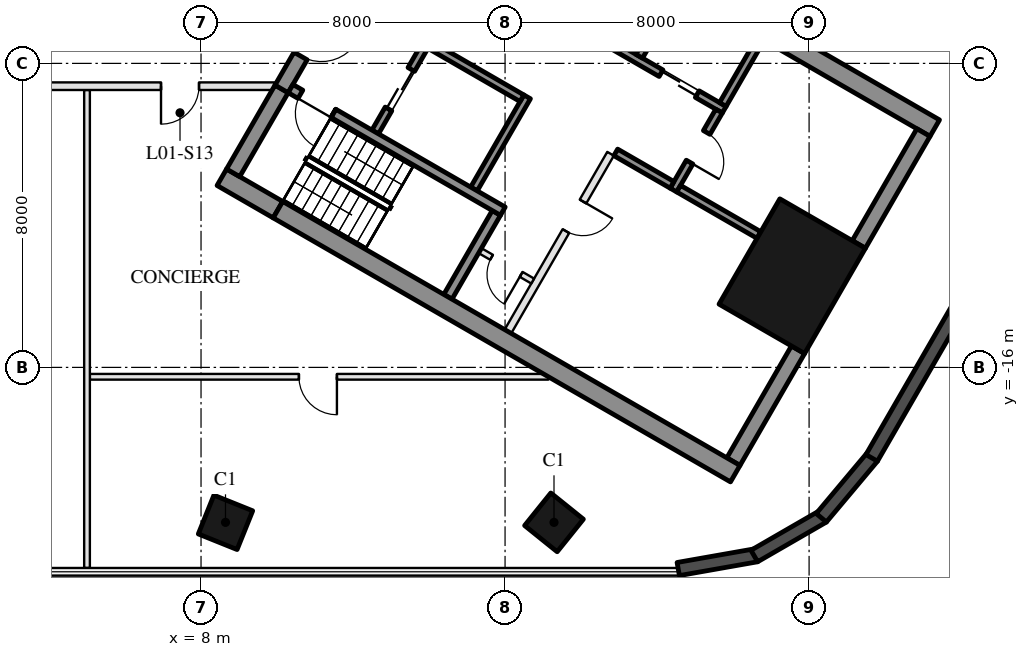
"""IFC4 building model, lengths in metres.
Left out: names, types, materials, properties, quantities, classifications, styles, units other than length and angle.
Written with IfcOpenShell. Run it as: python <this file> out.ifc"""

import sys

from ifc_helpers import new_model, si_unit, direction, frame, frame_2d, origin, origin_2d, place, context, subcontext, project, spatial, rectangle, hollow_rectangle, extrude, boolean, halfspace, element, fill, save


model = new_model("IFC4")
c1 = context("Model", 3, precision=1e-05, world=origin(), true_north=direction((0.0, 1.0)))
c2 = subcontext(c1, "Body", "Model", "MODEL_VIEW")
j1 = project(units=[si_unit("LENGTHUNIT", "METRE"), si_unit("PLANEANGLEUNIT", "RADIAN")], contexts=[c1])
p1 = place(None, origin())
s1 = spatial("IfcSite", under=j1, at=p1, CompositionType="ELEMENT")
p2 = place(p1, origin())
s2 = spatial("IfcBuilding", under=s1, at=p2, CompositionType="ELEMENT")
p3 = place(p2, frame((0.0, 0.0, 9.0)))
s3 = spatial("IfcBuildingStorey", under=s2, at=p3, CompositionType="ELEMENT", Elevation=9.0)
p4 = place(p3, frame((8.644, -20.078, 0.0), z_axis=(-0.04588570117, 0.114061937921, 0.9924134102), x_axis=(0.998942832746, 0.002476202234, 0.045902999109)))
e1 = element("IfcColumn", 1, at=p4, inside=s3, PredefinedType="COLUMN", context=c2, shape_type="SweptSolid", body=[
    boolean("DIFFERENCE", boolean("DIFFERENCE", extrude(hollow_rectangle(XDim=1.1, YDim=1.1, WallThickness=0.05, at=origin_2d()), origin(), (0.0, 0.0, 1.0), 6.55), halfspace(frame((0.0, 0.0, 0.017), z_axis=(0.0, 0.0, 1.0), x_axis=(1.0, 0.0, 0.0)), True)), halfspace(frame((0.0, 0.0, 6.534), z_axis=(0.0, 0.0, 1.0), x_axis=(1.0, 0.0, 0.0)), False)),
])
p5 = place(p3, frame((17.288, -20.078, 0.0), z_axis=(-0.091482931519, 0.113703399857, 0.989293894705), x_axis=(0.99579173161, 0.005008593821, 0.091508148518)))
e2 = element("IfcColumn", 2, at=p5, inside=s3, PredefinedType="COLUMN", context=c2, shape_type="SweptSolid", body=[
    boolean("DIFFERENCE", boolean("DIFFERENCE", extrude(hollow_rectangle(XDim=1.1, YDim=1.1, WallThickness=0.05, at=origin_2d()), origin(), (0.0, 0.0, 1.0), 6.57), halfspace(frame((0.0, 0.0, 0.019), z_axis=(0.0, 0.0, 1.0), x_axis=(1.0, 0.0, 0.0)), True)), halfspace(frame((0.0, 0.0, 6.552), z_axis=(0.0, 0.0, 1.0), x_axis=(1.0, 0.0, 0.0)), False)),
])
p6 = place(p3, frame((23.556, -13.6, 0.0), z_axis=(0.0, 0.0, 1.0), x_axis=(0.5, 0.866025403784, 0.0)))
e3 = element("IfcColumn", 3, at=p6, inside=s3, PredefinedType="COLUMN", context=c2, shape_type="SweptSolid", body=[
    extrude(hollow_rectangle(XDim=3.2, YDim=2.6, WallThickness=0.08, at=origin_2d()), origin(), (0.0, 0.0, 1.0), 6.5),
])
p7 = place(p3, frame((20.557, -21.306, 0.0), z_axis=(0.0, 0.0, 1.0), x_axis=(0.984816471064, 0.173598727877, 0.0)))
e4 = element("IfcWall", 4, at=p7, inside=s3, PredefinedType="SOLIDWALL", context=c2, shape_type="SweptSolid", body=[
    extrude(rectangle(XDim=2.09, YDim=0.35, at=frame_2d((1.045, 0.0))), origin(), (0.0, 0.0, 1.0), 6.15),
])
p8 = place(p3, frame((22.558, -20.964, 0.0), z_axis=(0.0, 0.0, 1.0), x_axis=(0.866049423672, 0.499958394027, 0.0)))
e5 = element("IfcWall", 5, at=p8, inside=s3, PredefinedType="SOLIDWALL", context=c2, shape_type="SweptSolid", body=[
    extrude(rectangle(XDim=2.09, YDim=0.35, at=frame_2d((1.045, 0.0))), origin(), (0.0, 0.0, 1.0), 6.15),
])
p9 = place(p3, frame((24.322, -19.958, 0.0), z_axis=(0.0, 0.0, 1.0), x_axis=(0.642731712352, 0.766091343076, 0.0)))
e6 = element("IfcWall", 6, at=p9, inside=s3, PredefinedType="SOLIDWALL", context=c2, shape_type="SweptSolid", body=[
    extrude(rectangle(XDim=2.09, YDim=0.35, at=frame_2d((1.045, 0.0))), origin(), (0.0, 0.0, 1.0), 6.15),
])
p10 = place(p3, frame((25.648, -18.382, 0.0), z_axis=(0.0, 0.0, 1.0), x_axis=(0.499981900942, 0.866035853028, 0.0)))
e7 = element("IfcWall", 7, at=p10, inside=s3, PredefinedType="SOLIDWALL", context=c2, shape_type="SweptSolid", body=[
    extrude(rectangle(XDim=6.191, YDim=0.35, at=frame_2d((3.095, 0.0))), origin(), (0.0, 0.0, 1.0), 6.15),
])
p11 = place(p3, frame((13.797, -1.903, 0.0), z_axis=(0.0, 0.0, 1.0), x_axis=(0.866024264262, -0.500001973705, 0.0)))
e8 = element("IfcWall", 8, at=p11, inside=s3, PredefinedType="SHEAR", context=c2, shape_type="SweptSolid", body=[
    extrude(rectangle(XDim=15.6, YDim=0.5, at=frame_2d((7.8, 0.0))), origin(), (0.0, 0.0, 1.0), 6.15),
])
p12 = place(p3, frame((25.309, -12.764, 0.0), z_axis=(0.0, 0.0, 1.0), x_axis=(0.499977295307, 0.866038511948, 0.0)))
e9 = element("IfcWall", 9, at=p12, inside=s3, PredefinedType="SHEAR", context=c2, shape_type="SweptSolid", body=[
    extrude(rectangle(XDim=3.4, YDim=0.4, at=frame_2d((1.7, 0.0))), origin(), (0.0, 0.0, 1.0), 6.15),
])
p13 = place(p3, frame((22.009, -18.48, 0.0), z_axis=(0.0, 0.0, 1.0), x_axis=(0.500008388397, 0.866020560687, 0.0)))
e10 = element("IfcWall", 10, at=p13, inside=s3, PredefinedType="SHEAR", context=c2, shape_type="SweptSolid", body=[
    extrude(rectangle(XDim=3.4, YDim=0.4, at=frame_2d((1.7, 0.0))), origin(), (0.0, 0.0, 1.0), 6.15),
])
p14 = place(p3, frame((14.496, -14.143, 0.0), z_axis=(0.0, 0.0, 1.0), x_axis=(0.500062241894, 0.865989465428, 0.0)))
e11 = element("IfcWall", 11, at=p14, inside=s3, PredefinedType="SHEAR", context=c2, shape_type="SweptSolid", body=[
    extrude(rectangle(XDim=2.55, YDim=0.25, at=frame_2d((1.275, 0.0))), origin(), (0.0, 0.0, 1.0), 6.15),
])
p15 = place(p3, frame((15.181, -11.305, 0.0), z_axis=(0.0, 0.0, 1.0), x_axis=(0.49994636267, 0.866056369097, 0.0)))
e12 = element("IfcWall", 12, at=p15, inside=s3, PredefinedType="SHEAR", context=c2, shape_type="SweptSolid", body=[
    extrude(rectangle(XDim=2.8, YDim=0.2, at=frame_2d((1.4, 0.0))), origin(), (0.0, 0.0, 1.0), 6.15),
])
p16 = place(p3, frame((12.583, -9.805, 0.0), z_axis=(0.0, 0.0, 1.0), x_axis=(0.49994636267, 0.866056369097, 0.0)))
e13 = element("IfcWall", 13, at=p16, inside=s3, PredefinedType="SHEAR", context=c2, shape_type="SweptSolid", body=[
    extrude(rectangle(XDim=2.8, YDim=0.2, at=frame_2d((1.4, 0.0))), origin(), (0.0, 0.0, 1.0), 6.15),
])
p17 = place(p16, frame((0.7, 0.0, 0.0)))
e14 = element("IfcOpeningElement", 14, at=p17, cuts=e13, PredefinedType="OPENING", context=c2, shape_type="SweptSolid", body=[
    extrude(rectangle(XDim=1.2, YDim=2.1, at=frame_2d((0.6, 1.05))), frame((0.0, 0.11, 0.0), z_axis=(0.0, -1.0, 0.0), x_axis=(1.0, 0.0, 0.0)), (0.0, 0.0, 1.0), 0.22),
])
p18 = place(p3, frame((14.02, -7.517, 0.0), z_axis=(0.0, 0.0, 1.0), x_axis=(0.866034573852, -0.49998411664, 0.0)))
e15 = element("IfcWall", 15, at=p18, inside=s3, PredefinedType="SHEAR", context=c2, shape_type="SweptSolid", body=[
    extrude(rectangle(XDim=2.8, YDim=0.2, at=frame_2d((1.4, 0.0))), origin(), (0.0, 0.0, 1.0), 6.15),
])
p19 = place(p3, frame((12.968, -4.138, 0.0), z_axis=(0.0, 0.0, 1.0), x_axis=(0.866028328073, -0.49999493495, 0.0)))
e16 = element("IfcWall", 16, at=p19, inside=s3, PredefinedType="SHEAR", context=c2, shape_type="SweptSolid", body=[
    extrude(rectangle(XDim=10.16, YDim=0.2, at=frame_2d((5.08, 0.0))), origin(), (0.0, 0.0, 1.0), 6.15),
])
p20 = place(p19, frame((0.62, 0.0, 0.0)))
e17 = element("IfcOpeningElement", 17, at=p20, cuts=e16, PredefinedType="OPENING", context=c2, shape_type="SweptSolid", body=[
    extrude(rectangle(XDim=1.1, YDim=2.1, at=frame_2d((0.55, 1.05))), frame((0.0, 0.11, 0.0), z_axis=(0.0, -1.0, 0.0), x_axis=(1.0, 0.0, 0.0)), (0.0, 0.0, 1.0), 0.22),
])
p21 = place(p19, frame((3.16, 0.0, 0.0)))
e18 = element("IfcOpeningElement", 18, at=p21, cuts=e16, PredefinedType="OPENING", context=c2, shape_type="SweptSolid", body=[
    extrude(rectangle(XDim=1.1, YDim=2.1, at=frame_2d((0.55, 1.05))), frame((0.0, 0.11, 0.0), z_axis=(0.0, -1.0, 0.0), x_axis=(1.0, 0.0, 0.0)), (0.0, 0.0, 1.0), 0.22),
])
p22 = place(p19, frame((5.7, 0.0, 0.0)))
e19 = element("IfcOpeningElement", 19, at=p22, cuts=e16, PredefinedType="OPENING", context=c2, shape_type="SweptSolid", body=[
    extrude(rectangle(XDim=1.1, YDim=2.1, at=frame_2d((0.55, 1.05))), frame((0.0, 0.11, 0.0), z_axis=(0.0, -1.0, 0.0), x_axis=(1.0, 0.0, 0.0)), (0.0, 0.0, 1.0), 0.22),
])
p23 = place(p19, frame((8.24, 0.0, 0.0)))
e20 = element("IfcOpeningElement", 20, at=p23, cuts=e16, PredefinedType="OPENING", context=c2, shape_type="SweptSolid", body=[
    extrude(rectangle(XDim=1.1, YDim=2.1, at=frame_2d((0.55, 1.05))), frame((0.0, 0.11, 0.0), z_axis=(0.0, -1.0, 0.0), x_axis=(1.0, 0.0, 0.0)), (0.0, 0.0, 1.0), 0.22),
])
p24 = place(p3, frame((20.43, -11.333, 0.0), z_axis=(0.0, 0.0, 1.0), x_axis=(0.500001309137, 0.866024647952, 0.0)))
e21 = element("IfcWall", 21, at=p24, inside=s3, PredefinedType="SHEAR", context=c2, shape_type="SweptSolid", body=[
    extrude(rectangle(XDim=2.4, YDim=0.2, at=frame_2d((1.2, 0.0))), origin(), (0.0, 0.0, 1.0), 6.15),
])
p25 = place(p24, frame((0.85, 0.0, 0.0)))
e22 = element("IfcOpeningElement", 22, at=p25, cuts=e21, PredefinedType="OPENING", context=c2, shape_type="SweptSolid", body=[
    extrude(rectangle(XDim=0.9, YDim=2.1, at=frame_2d((0.45, 1.05))), frame((0.0, 0.11, 0.0), z_axis=(0.0, -1.0, 0.0), x_axis=(1.0, 0.0, 0.0)), (0.0, 0.0, 1.0), 0.22),
])
p26 = place(p3, frame((18.913, -10.342, 0.0), z_axis=(0.0, 0.0, 1.0), x_axis=(0.866038183914, -0.499977863513, 0.0)))
e23 = element("IfcWall", 23, at=p26, inside=s3, PredefinedType="SHEAR", context=c2, shape_type="SweptSolid", body=[
    extrude(rectangle(XDim=1.71, YDim=0.2, at=frame_2d((0.855, 0.0))), origin(), (0.0, 0.0, 1.0), 6.15),
])
for number, where, z_axis, x_axis in (
    (24, (19.531, -7.812, 0.0), (0.0, 0.0, 1.0), (0.5, 0.866, 0.0)),
    (25, (21.73, -9.082, 0.0), (0.0, 0.0, 1.0), (0.5, 0.866, 0.0)),
):
    element("IfcWall", number, at=place(p3, frame(where, z_axis=z_axis, x_axis=x_axis)), inside=s3, PredefinedType="SHEAR", context=c2, shape_type="SweptSolid", body=[
        extrude(rectangle(XDim=2.0, YDim=0.2, at=frame_2d((1.0, 0.0))), origin(), (0.0, 0.0, 1.0), 6.15),
    ])
p27 = place(p3, frame((20.567, -11.297, 0.0), z_axis=(0.0, 0.0, 1.0), x_axis=(0.866048967903, -0.499959183527, 0.0)))
e26 = element("IfcWall", 26, at=p27, inside=s3, PredefinedType="SHEAR", context=c2, shape_type="SweptSolid", body=[
    extrude(rectangle(XDim=2.44, YDim=0.2, at=frame_2d((1.22, 0.0))), origin(), (0.0, 0.0, 1.0), 6.15),
])
p28 = place(p3, frame((16.076, -15.055, 0.0), z_axis=(0.0, 0.0, 1.0), x_axis=(0.499995103361, 0.866028230842, 0.0)))
e27 = element("IfcWall", 27, at=p28, inside=s3, PredefinedType="PARTITIONING", context=c2, shape_type="SweptSolid", body=[
    extrude(rectangle(XDim=5.4, YDim=0.2, at=frame_2d((2.7, 0.0))), origin(), (0.0, 0.0, 1.0), 6.15),
])
p29 = place(p28, frame((3.05, 0.0, 0.0)))
e28 = element("IfcOpeningElement", 28, at=p29, cuts=e27, PredefinedType="OPENING", context=c2, shape_type="SweptSolid", body=[
    extrude(rectangle(XDim=0.9, YDim=2.1, at=frame_2d((0.45, 1.05))), frame((0.0, 0.11, 0.0), z_axis=(0.0, -1.0, 0.0), x_axis=(1.0, 0.0, 0.0)), (0.0, 0.0, 1.0), 0.22),
])
p30 = place(p3, frame((15.342, -12.928, 0.0), z_axis=(0.0, 0.0, 1.0), x_axis=(0.865989903783, -0.500061482766, 0.0)))
e29 = element("IfcWall", 29, at=p30, inside=s3, PredefinedType="PARTITIONING", context=c2, shape_type="SweptSolid", body=[
    extrude(rectangle(XDim=1.6, YDim=0.15, at=frame_2d((0.8, 0.0))), origin(), (0.0, 0.0, 1.0), 6.15),
])
p31 = place(p30, frame((0.35, 0.0, 0.0)))
e30 = element("IfcOpeningElement", 30, at=p31, cuts=e29, PredefinedType="OPENING", context=c2, shape_type="SweptSolid", body=[
    extrude(rectangle(XDim=0.9, YDim=2.1, at=frame_2d((0.45, 1.05))), frame((0.0, 0.085, 0.0), z_axis=(0.0, -1.0, 0.0), x_axis=(1.0, 0.0, 0.0)), (0.0, 0.0, 1.0), 0.17),
])
p32 = place(p3, frame((8.547, -10.997, 0.0), z_axis=(0.0, 0.0, 1.0), x_axis=(0.866033076574, -0.499986710104, 0.0)))
e31 = element("IfcWall", 31, at=p32, inside=s3, PredefinedType="SHEAR", context=c2, shape_type="SweptSolid", body=[
    extrude(rectangle(XDim=1.706, YDim=0.5, at=frame_2d((0.853, 0.0))), origin(), (0.0, 0.0, 1.0), 6.15),
])
p33 = place(p3, frame((10.024, -11.85, 0.0), z_axis=(0.0, 0.0, 1.0), x_axis=(0.86602318214, -0.500003847982, 0.0)))
e32 = element("IfcWall", 32, at=p33, inside=s3, PredefinedType="SHEAR", context=c2, shape_type="SweptSolid", body=[
    extrude(rectangle(XDim=13.894, YDim=0.5, at=frame_2d((6.947, 0.0))), origin(), (0.0, 0.0, 1.0), 6.15),
])
p34 = place(p3, frame((8.845, -10.88, 0.0), z_axis=(0.0, 0.0, 1.0), x_axis=(0.499990435942, 0.866030925526, 0.0)))
e33 = element("IfcWall", 33, at=p34, inside=s3, PredefinedType="SHEAR", context=c2, shape_type="SweptSolid", body=[
    extrude(rectangle(XDim=2.55, YDim=0.4, at=frame_2d((1.275, 0.0))), origin(), (0.0, 0.0, 1.0), 6.15),
])
p35 = place(p3, frame((10.12, -8.672, 0.0), z_axis=(0.0, 0.0, 1.0), x_axis=(0.500008956979, 0.866020232408, 0.0)))
e34 = element("IfcWall", 34, at=p35, inside=s3, PredefinedType="SHEAR", context=c2, shape_type="SweptSolid", body=[
    extrude(rectangle(XDim=7.45, YDim=0.4, at=frame_2d((3.725, 0.0))), origin(), (0.0, 0.0, 1.0), 6.15),
])
p36 = place(p35, frame((1.0, 0.0, 0.0)))
e35 = element("IfcOpeningElement", 35, at=p36, cuts=e34, PredefinedType="OPENING", context=c2, shape_type="SweptSolid", body=[
    extrude(rectangle(XDim=1.1, YDim=2.1, at=frame_2d((0.55, 1.05))), frame((0.0, 0.21, 0.0), z_axis=(0.0, -1.0, 0.0), x_axis=(1.0, 0.0, 0.0)), (0.0, 0.0, 1.0), 0.42),
])
p37 = place(p35, frame((3.3, 0.0, 0.0)))
e36 = element("IfcOpeningElement", 36, at=p37, cuts=e34, PredefinedType="OPENING", context=c2, shape_type="SweptSolid", body=[
    extrude(rectangle(XDim=1.4, YDim=2.1, at=frame_2d((0.7, 1.05))), frame((0.0, 0.21, 0.0), z_axis=(0.0, -1.0, 0.0), x_axis=(1.0, 0.0, 0.0)), (0.0, 0.0, 1.0), 0.42),
])
p38 = place(p3, frame((10.356, -8.664, 0.0), z_axis=(0.0, 0.0, 1.0), x_axis=(0.866095317631, -0.499878886109, 0.0)))
e37 = element("IfcWall", 37, at=p38, inside=s3, PredefinedType="SHEAR", context=c2, shape_type="SweptSolid", body=[
    extrude(rectangle(XDim=1.306, YDim=0.25, at=frame_2d((0.653, 0.0))), origin(), (0.0, 0.0, 1.0), 6.15),
])
p39 = place(p38, frame((0.3, 0.0, 0.0)))
e38 = element("IfcOpeningElement", 38, at=p39, cuts=e37, PredefinedType="OPENING", context=c2, shape_type="SweptSolid", body=[
    extrude(rectangle(XDim=1.0, YDim=2.1, at=frame_2d((0.5, 1.05))), frame((0.0, 0.135, 0.0), z_axis=(0.0, -1.0, 0.0), x_axis=(1.0, 0.0, 0.0)), (0.0, 0.0, 1.0), 0.27),
])
p40 = place(p3, frame((11.487, -9.316, 0.0), z_axis=(0.0, 0.0, 1.0), x_axis=(0.866011695431, -0.500023742813, 0.0)))
e39 = element("IfcWall", 39, at=p40, inside=s3, PredefinedType="SHEAR", context=c2, shape_type="SweptSolid", body=[
    extrude(rectangle(XDim=5.144, YDim=0.25, at=frame_2d((2.572, 0.0))), origin(), (0.0, 0.0, 1.0), 6.15),
])
p41 = place(p3, frame((5.075, -16.247, 0.0), z_axis=(0.0, 0.0, 1.0), x_axis=(1.0, 0.0, 0.0)))
e40 = element("IfcWall", 40, at=p41, inside=s3, PredefinedType="PARTITIONING", context=c2, shape_type="SweptSolid", body=[
    extrude(rectangle(XDim=12.066, YDim=0.15, at=frame_2d((6.033, 0.0))), origin(), (0.0, 0.0, 1.0), 5.36),
])
p42 = place(p41, frame((5.501, 0.0, 0.0)))
e41 = element("IfcOpeningElement", 41, at=p42, cuts=e40, PredefinedType="OPENING", context=c2, shape_type="SweptSolid", body=[
    extrude(rectangle(XDim=1.0, YDim=2.1, at=frame_2d((0.5, 1.05))), frame((0.0, 0.085, 0.0), z_axis=(0.0, -1.0, 0.0), x_axis=(1.0, 0.0, 0.0)), (0.0, 0.0, 1.0), 0.17),
])
p43 = place(p3, frame((5.0, -21.278, 0.0), z_axis=(0.0, 0.0, 1.0), x_axis=(0.0, 1.0, 0.0)))
e42 = element("IfcWall", 42, at=p43, inside=s3, PredefinedType="PARTITIONING", context=c2, shape_type="SweptSolid", body=[
    extrude(rectangle(XDim=12.578, YDim=0.15, at=frame_2d((6.289, 0.0))), origin(), (0.0, 0.0, 1.0), 5.55),
])
p44 = place(p3, frame((-9.93, -8.6, 0.0), z_axis=(0.0, 0.0, 1.0), x_axis=(1.0, 0.0, 0.0)))
e43 = element("IfcWall", 43, at=p44, inside=s3, PredefinedType="PARTITIONING", context=c2, shape_type="SweptSolid", body=[
    extrude(rectangle(XDim=19.861, YDim=0.2, at=frame_2d((9.93, 0.0))), origin(), (0.0, 0.0, 1.0), 5.36),
])
p45 = place(p44, frame((1.234, 0.0, 0.0)))
e44 = element("IfcOpeningElement", 44, at=p45, cuts=e43, PredefinedType="OPENING", context=c2, shape_type="SweptSolid", body=[
    extrude(rectangle(XDim=1.2, YDim=2.1, at=frame_2d((0.6, 1.05))), frame((0.0, 0.11, 0.0), z_axis=(0.0, -1.0, 0.0), x_axis=(1.0, 0.0, 0.0)), (0.0, 0.0, 1.0), 0.22),
])
p46 = place(p44, frame((5.537, 0.0, 0.0)))
e45 = element("IfcOpeningElement", 45, at=p46, cuts=e43, PredefinedType="OPENING", context=c2, shape_type="SweptSolid", body=[
    extrude(rectangle(XDim=1.8, YDim=2.4, at=frame_2d((0.9, 1.2))), frame((0.0, 0.11, 0.0), z_axis=(0.0, -1.0, 0.0), x_axis=(1.0, 0.0, 0.0)), (0.0, 0.0, 1.0), 0.22),
])
p47 = place(p44, frame((11.224, 0.0, 0.0)))
e46 = element("IfcOpeningElement", 46, at=p47, cuts=e43, PredefinedType="OPENING", context=c2, shape_type="SweptSolid", body=[
    extrude(rectangle(XDim=1.8, YDim=2.4, at=frame_2d((0.9, 1.2))), frame((0.0, 0.11, 0.0), z_axis=(0.0, -1.0, 0.0), x_axis=(1.0, 0.0, 0.0)), (0.0, 0.0, 1.0), 0.22),
])
p48 = place(p44, frame((16.877, 0.0, 0.0)))
e47 = element("IfcOpeningElement", 47, at=p48, cuts=e43, PredefinedType="OPENING", context=c2, shape_type="SweptSolid", body=[
    extrude(rectangle(XDim=1.0, YDim=2.1, at=frame_2d((0.5, 1.05))), frame((0.0, 0.11, 0.0), z_axis=(0.0, -1.0, 0.0), x_axis=(1.0, 0.0, 0.0)), (0.0, 0.0, 1.0), 0.22),
])
p49 = place(p17, origin())
e48 = element("IfcDoor", 48, at=p49, inside=s3, OperationType="DOUBLE_DOOR_SLIDING", PredefinedType="DOOR", context=c2, shape_type="SweptSolid", body=[
    extrude(rectangle(XDim=1.2, YDim=2.1, at=frame_2d((0.6, 1.05))), frame((0.0, 0.025, 0.0), z_axis=(0.0, -1.0, 0.0), x_axis=(1.0, 0.0, 0.0)), (0.0, 0.0, 1.0), 0.05),
])
fill(e14, e48)
p50 = place(p31, frame((0.9, 0.0, 0.0), z_axis=(0.0, 0.0, 1.0), x_axis=(-1.0, 0.0, 0.0)))
e49 = element("IfcDoor", 49, at=p50, inside=s3, OperationType="SINGLE_SWING_LEFT", PredefinedType="DOOR", context=c2, shape_type="SweptSolid", body=[
    extrude(rectangle(XDim=0.9, YDim=2.1, at=frame_2d((0.45, 1.05))), frame((0.0, 0.025, 0.0), z_axis=(0.0, -1.0, 0.0), x_axis=(1.0, 0.0, 0.0)), (0.0, 0.0, 1.0), 0.05),
])
fill(e30, e49)
p51 = place(p23, origin())
e50 = element("IfcDoor", 50, at=p51, inside=s3, OperationType="DOUBLE_DOOR_SLIDING", PredefinedType="DOOR", context=c2, shape_type="SweptSolid", body=[
    extrude(rectangle(XDim=1.1, YDim=2.1, at=frame_2d((0.55, 1.05))), frame((0.0, 0.025, 0.0), z_axis=(0.0, -1.0, 0.0), x_axis=(1.0, 0.0, 0.0)), (0.0, 0.0, 1.0), 0.05),
])
fill(e20, e50)
p52 = place(p25, frame((0.9, 0.0, 0.0), z_axis=(0.0, 0.0, 1.0), x_axis=(-1.0, 0.0, 0.0)))
e51 = element("IfcDoor", 51, at=p52, inside=s3, OperationType="SINGLE_SWING_RIGHT", PredefinedType="DOOR", context=c2, shape_type="SweptSolid", body=[
    extrude(rectangle(XDim=0.9, YDim=2.1, at=frame_2d((0.45, 1.05))), frame((0.0, 0.025, 0.0), z_axis=(0.0, -1.0, 0.0), x_axis=(1.0, 0.0, 0.0)), (0.0, 0.0, 1.0), 0.05),
])
fill(e22, e51)
p53 = place(p29, frame((0.9, 0.0, 0.0), z_axis=(0.0, 0.0, 1.0), x_axis=(-1.0, 0.0, 0.0)))
e52 = element("IfcDoor", 52, at=p53, inside=s3, OperationType="SINGLE_SWING_LEFT", PredefinedType="DOOR", context=c2, shape_type="SweptSolid", body=[
    extrude(rectangle(XDim=0.9, YDim=2.1, at=frame_2d((0.45, 1.05))), frame((0.0, 0.025, 0.0), z_axis=(0.0, -1.0, 0.0), x_axis=(1.0, 0.0, 0.0)), (0.0, 0.0, 1.0), 0.05),
])
fill(e28, e52)
p54 = place(p36, frame((1.1, 0.0, 0.0), z_axis=(0.0, 0.0, 1.0), x_axis=(-1.0, 0.0, 0.0)))
e53 = element("IfcDoor", 53, at=p54, inside=s3, OperationType="SINGLE_SWING_LEFT", PredefinedType="DOOR", context=c2, shape_type="SweptSolid", body=[
    extrude(rectangle(XDim=1.1, YDim=2.1, at=frame_2d((0.55, 1.05))), frame((0.0, 0.025, 0.0), z_axis=(0.0, -1.0, 0.0), x_axis=(1.0, 0.0, 0.0)), (0.0, 0.0, 1.0), 0.05),
])
fill(e35, e53)
p55 = place(p39, frame((1.0, 0.0, 0.0), z_axis=(0.0, 0.0, 1.0), x_axis=(-1.0, 0.0, 0.0)))
e54 = element("IfcDoor", 54, at=p55, inside=s3, OperationType="SINGLE_SWING_LEFT", PredefinedType="DOOR", context=c2, shape_type="SweptSolid", body=[
    extrude(rectangle(XDim=1.0, YDim=2.1, at=frame_2d((0.5, 1.05))), frame((0.0, 0.025, 0.0), z_axis=(0.0, -1.0, 0.0), x_axis=(1.0, 0.0, 0.0)), (0.0, 0.0, 1.0), 0.05),
])
fill(e38, e54)
p56 = place(p48, frame((1.0, 0.0, 0.0), z_axis=(0.0, 0.0, 1.0), x_axis=(-1.0, 0.0, 0.0)))
e55 = element("IfcDoor", 55, at=p56, inside=s3, OperationType="SINGLE_SWING_RIGHT", PredefinedType="DOOR", context=c2, shape_type="SweptSolid", body=[
    extrude(rectangle(XDim=1.0, YDim=2.1, at=frame_2d((0.5, 1.05))), frame((0.0, 0.025, 0.0), z_axis=(0.0, -1.0, 0.0), x_axis=(1.0, 0.0, 0.0)), (0.0, 0.0, 1.0), 0.05),
])
fill(e47, e55)
p57 = place(p42, frame((1.0, 0.0, 0.0), z_axis=(0.0, 0.0, 1.0), x_axis=(-1.0, 0.0, 0.0)))
e56 = element("IfcDoor", 56, at=p57, inside=s3, OperationType="SINGLE_SWING_LEFT", PredefinedType="DOOR", context=c2, shape_type="SweptSolid", body=[
    extrude(rectangle(XDim=1.0, YDim=2.1, at=frame_2d((0.5, 1.05))), frame((0.0, 0.025, 0.0), z_axis=(0.0, -1.0, 0.0), x_axis=(1.0, 0.0, 0.0)), (0.0, 0.0, 1.0), 0.05),
])
fill(e41, e56)
save(model, sys.argv[1])
